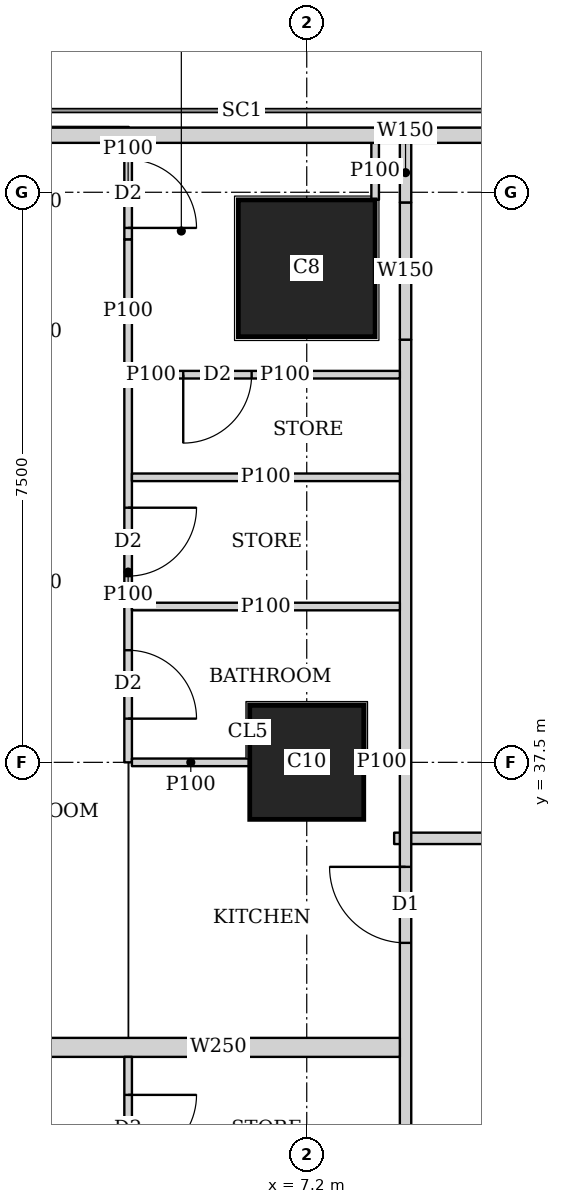
"""IFC4 building model, lengths in metres.
Left out: names, types, materials, properties, quantities, classifications, styles, units other than length and angle.
Written with IfcOpenShell. Run it as: python <this file> out.ifc"""

import sys

from ifc_helpers import new_model, si_unit, direction, frame, frame_2d, origin, origin_2d, place, context, subcontext, project, spatial, rectangle, extrude, element, fill, save


model = new_model("IFC4")
c1 = context("Model", 3, precision=1e-05, world=origin(), true_north=direction((0.0, 1.0)))
c2 = subcontext(c1, "Body", "Model", "MODEL_VIEW")
j1 = project(units=[si_unit("LENGTHUNIT", "METRE"), si_unit("PLANEANGLEUNIT", "RADIAN")], contexts=[c1])
p1 = place(None, origin())
s1 = spatial("IfcSite", under=j1, at=p1, CompositionType="ELEMENT")
p2 = place(p1, origin())
s2 = spatial("IfcBuilding", under=s1, at=p2, CompositionType="ELEMENT")
p3 = place(p2, frame((0.0, 0.0, 180.8)))
s3 = spatial("IfcBuildingStorey", under=s2, at=p3, CompositionType="ELEMENT", Elevation=180.8)
p4 = place(p3, frame((7.2, 37.5, 0.0), z_axis=(0.0, 0.0, 1.0), x_axis=(1.0, 0.0, 0.0)))
e1 = element("IfcColumn", 1, at=p4, inside=s3, PredefinedType="COLUMN", context=c2, shape_type="SweptSolid", body=[
    extrude(rectangle(XDim=1.5, YDim=1.5, at=origin_2d()), origin(), (0.0, 0.0, 1.0), 3.75),
])
p5 = place(p3, frame((7.2, 44.0, 0.0), z_axis=(0.0, 0.0, 1.0), x_axis=(1.0, 0.0, 0.0)))
e2 = element("IfcColumn", 2, at=p5, inside=s3, PredefinedType="COLUMN", context=c2, shape_type="SweptSolid", body=[
    extrude(rectangle(XDim=1.8, YDim=1.8, at=origin_2d()), origin(), (0.0, 0.0, 1.0), 3.75),
])
p6 = place(p3, frame((40.106, 45.75, 0.0), z_axis=(0.0, 0.0, 1.0), x_axis=(-1.0, 0.0, 0.0)))
e3 = element("IfcWall", 3, at=p6, inside=s3, PredefinedType="SOLIDWALL", context=c2, shape_type="SweptSolid", body=[
    extrude(rectangle(XDim=37.943, YDim=0.2, at=frame_2d((18.971, 0.0))), origin(), (0.0, 0.0, 1.0), 3.5),
])
p7 = place(p6, frame((8.606, 0.0, 0.9)))
e4 = element("IfcOpeningElement", 4, at=p7, cuts=e3, PredefinedType="OPENING", context=c2, shape_type="SweptSolid", body=[
    extrude(rectangle(XDim=1.8, YDim=1.5, at=frame_2d((0.9, 0.75))), frame((0.0, 0.11, 0.0), z_axis=(0.0, -1.0, 0.0), x_axis=(1.0, 0.0, 0.0)), (0.0, 0.0, 1.0), 0.22),
])
p8 = place(p6, frame((12.206, 0.0, 0.9)))
e5 = element("IfcOpeningElement", 5, at=p8, cuts=e3, PredefinedType="OPENING", context=c2, shape_type="SweptSolid", body=[
    extrude(rectangle(XDim=1.8, YDim=1.5, at=frame_2d((0.9, 0.75))), frame((0.0, 0.11, 0.0), z_axis=(0.0, -1.0, 0.0), x_axis=(1.0, 0.0, 0.0)), (0.0, 0.0, 1.0), 0.22),
])
p9 = place(p6, frame((15.806, 0.0, 0.9)))
e6 = element("IfcOpeningElement", 6, at=p9, cuts=e3, PredefinedType="OPENING", context=c2, shape_type="SweptSolid", body=[
    extrude(rectangle(XDim=1.8, YDim=1.5, at=frame_2d((0.9, 0.75))), frame((0.0, 0.11, 0.0), z_axis=(0.0, -1.0, 0.0), x_axis=(1.0, 0.0, 0.0)), (0.0, 0.0, 1.0), 0.22),
])
p10 = place(p6, frame((19.406, 0.0, 0.9)))
e7 = element("IfcOpeningElement", 7, at=p10, cuts=e3, PredefinedType="OPENING", context=c2, shape_type="SweptSolid", body=[
    extrude(rectangle(XDim=1.8, YDim=1.5, at=frame_2d((0.9, 0.75))), frame((0.0, 0.11, 0.0), z_axis=(0.0, -1.0, 0.0), x_axis=(1.0, 0.0, 0.0)), (0.0, 0.0, 1.0), 0.22),
])
p11 = place(p6, frame((23.006, 0.0, 0.9)))
e8 = element("IfcOpeningElement", 8, at=p11, cuts=e3, PredefinedType="OPENING", context=c2, shape_type="SweptSolid", body=[
    extrude(rectangle(XDim=1.8, YDim=1.5, at=frame_2d((0.9, 0.75))), frame((0.0, 0.11, 0.0), z_axis=(0.0, -1.0, 0.0), x_axis=(1.0, 0.0, 0.0)), (0.0, 0.0, 1.0), 0.22),
])
p12 = place(p6, frame((26.606, 0.0, 0.9)))
e9 = element("IfcOpeningElement", 9, at=p12, cuts=e3, PredefinedType="OPENING", context=c2, shape_type="SweptSolid", body=[
    extrude(rectangle(XDim=1.8, YDim=1.5, at=frame_2d((0.9, 0.75))), frame((0.0, 0.11, 0.0), z_axis=(0.0, -1.0, 0.0), x_axis=(1.0, 0.0, 0.0)), (0.0, 0.0, 1.0), 0.22),
])
p13 = place(p3, frame((8.5, 1.964, 0.0), z_axis=(0.0, 0.0, 1.0), x_axis=(0.0, 1.0, 0.0)))
e10 = element("IfcWall", 10, at=p13, inside=s3, PredefinedType="SOLIDWALL", context=c2, shape_type="SweptSolid", body=[
    extrude(rectangle(XDim=41.097, YDim=0.15, at=frame_2d((20.548, 0.0))), origin(), (0.0, 0.0, 1.0), 3.5),
])
p14 = place(p13, frame((10.661, 0.0, 0.0)))
e11 = element("IfcOpeningElement", 11, at=p14, cuts=e10, PredefinedType="OPENING", context=c2, shape_type="SweptSolid", body=[
    extrude(rectangle(XDim=1.0, YDim=2.1, at=frame_2d((0.5, 1.05))), frame((0.0, 0.085, 0.0), z_axis=(0.0, -1.0, 0.0), x_axis=(1.0, 0.0, 0.0)), (0.0, 0.0, 1.0), 0.17),
])
p15 = place(p13, frame((14.411, 0.0, 0.0)))
e12 = element("IfcOpeningElement", 12, at=p15, cuts=e10, PredefinedType="OPENING", context=c2, shape_type="SweptSolid", body=[
    extrude(rectangle(XDim=1.0, YDim=2.1, at=frame_2d((0.5, 1.05))), frame((0.0, 0.085, 0.0), z_axis=(0.0, -1.0, 0.0), x_axis=(1.0, 0.0, 0.0)), (0.0, 0.0, 1.0), 0.17),
])
p16 = place(p13, frame((21.911, 0.0, 0.0)))
e13 = element("IfcOpeningElement", 13, at=p16, cuts=e10, PredefinedType="OPENING", context=c2, shape_type="SweptSolid", body=[
    extrude(rectangle(XDim=1.0, YDim=2.1, at=frame_2d((0.5, 1.05))), frame((0.0, 0.085, 0.0), z_axis=(0.0, -1.0, 0.0), x_axis=(1.0, 0.0, 0.0)), (0.0, 0.0, 1.0), 0.17),
])
p17 = place(p13, frame((33.161, 0.0, 0.0)))
e14 = element("IfcOpeningElement", 14, at=p17, cuts=e10, PredefinedType="OPENING", context=c2, shape_type="SweptSolid", body=[
    extrude(rectangle(XDim=1.0, YDim=2.1, at=frame_2d((0.5, 1.05))), frame((0.0, 0.085, 0.0), z_axis=(0.0, -1.0, 0.0), x_axis=(1.0, 0.0, 0.0)), (0.0, 0.0, 1.0), 0.17),
])
p18 = place(p3, frame((8.5, 43.061, 0.0), z_axis=(0.0, 0.0, 1.0), x_axis=(0.0, 1.0, 0.0)))
e15 = element("IfcWall", 15, at=p18, inside=s3, PredefinedType="SOLIDWALL", context=c2, shape_type="SweptSolid", body=[
    extrude(rectangle(XDim=1.805, YDim=0.15, at=frame_2d((0.902, 0.0))), origin(), (0.0, 0.0, 1.0), 2.1),
])
p19 = place(p3, frame((8.5, 44.866, 0.0), z_axis=(0.0, 0.0, 1.0), x_axis=(0.0, 1.0, 0.0)))
e16 = element("IfcWall", 16, at=p19, inside=s3, PredefinedType="SOLIDWALL", context=c2, shape_type="SweptSolid", body=[
    extrude(rectangle(XDim=0.784, YDim=0.15, at=frame_2d((0.392, 0.0))), origin(), (0.0, 0.0, 1.0), 3.5),
])
p20 = place(p3, frame((8.35, 36.5, 0.0), z_axis=(0.0, 0.0, 1.0), x_axis=(1.0, 0.0, 0.0)))
e17 = element("IfcWall", 17, at=p20, inside=s3, PredefinedType="SOLIDWALL", context=c2, shape_type="SweptSolid", body=[
    extrude(rectangle(XDim=26.415, YDim=0.15, at=frame_2d((13.208, 0.0))), origin(), (0.0, 0.0, 1.0), 3.5),
])
p21 = place(p20, frame((2.6, 0.0, 0.0)))
e18 = element("IfcOpeningElement", 18, at=p21, cuts=e17, PredefinedType="OPENING", context=c2, shape_type="SweptSolid", body=[
    extrude(rectangle(XDim=1.0, YDim=2.1, at=frame_2d((0.5, 1.05))), frame((0.0, 0.085, 0.0), z_axis=(0.0, -1.0, 0.0), x_axis=(1.0, 0.0, 0.0)), (0.0, 0.0, 1.0), 0.17),
])
p22 = place(p20, frame((14.75, 0.0, 0.0)))
e19 = element("IfcOpeningElement", 19, at=p22, cuts=e17, PredefinedType="OPENING", context=c2, shape_type="SweptSolid", body=[
    extrude(rectangle(XDim=1.0, YDim=2.1, at=frame_2d((0.5, 1.05))), frame((0.0, 0.085, 0.0), z_axis=(0.0, -1.0, 0.0), x_axis=(1.0, 0.0, 0.0)), (0.0, 0.0, 1.0), 0.17),
])
p23 = place(p20, frame((23.923, 0.0, 0.0)))
e20 = element("IfcOpeningElement", 20, at=p23, cuts=e17, PredefinedType="OPENING", context=c2, shape_type="SweptSolid", body=[
    extrude(rectangle(XDim=1.0, YDim=2.1, at=frame_2d((0.5, 1.05))), frame((0.0, 0.085, 0.0), z_axis=(0.0, -1.0, 0.0), x_axis=(1.0, 0.0, 0.0)), (0.0, 0.0, 1.0), 0.17),
])
p24 = place(p3, frame((8.1, 45.65, 0.0), z_axis=(0.0, 0.0, 1.0), x_axis=(0.0, -1.0, 0.0)))
e21 = element("IfcWall", 21, at=p24, inside=s3, PredefinedType="PARTITIONING", context=c2, shape_type="SweptSolid", body=[
    extrude(rectangle(XDim=0.749, YDim=0.1, at=frame_2d((0.375, 0.0))), origin(), (0.0, 0.0, 1.0), 3.5),
])
p25 = place(p3, frame((4.85, 26.25, 0.0), z_axis=(0.0, 0.0, 1.0), x_axis=(0.0, 1.0, 0.0)))
e22 = element("IfcWall", 22, at=p25, inside=s3, PredefinedType="PARTITIONING", context=c2, shape_type="SweptSolid", body=[
    extrude(rectangle(XDim=7.375, YDim=0.1, at=frame_2d((3.688, 0.0))), origin(), (0.0, 0.0, 1.0), 3.5),
])
p26 = place(p25, frame((0.575, 0.0, 0.0)))
e23 = element("IfcOpeningElement", 23, at=p26, cuts=e22, PredefinedType="OPENING", context=c2, shape_type="SweptSolid", body=[
    extrude(rectangle(XDim=0.9, YDim=2.1, at=frame_2d((0.45, 1.05))), frame((0.0, 0.06, 0.0), z_axis=(0.0, -1.0, 0.0), x_axis=(1.0, 0.0, 0.0)), (0.0, 0.0, 1.0), 0.12),
])
p27 = place(p25, frame((4.1, 0.0, 0.0)))
e24 = element("IfcOpeningElement", 24, at=p27, cuts=e22, PredefinedType="OPENING", context=c2, shape_type="SweptSolid", body=[
    extrude(rectangle(XDim=0.9, YDim=2.1, at=frame_2d((0.45, 1.05))), frame((0.0, 0.06, 0.0), z_axis=(0.0, -1.0, 0.0), x_axis=(1.0, 0.0, 0.0)), (0.0, 0.0, 1.0), 0.12),
])
p28 = place(p25, frame((2.45, 0.0, 0.0)))
e25 = element("IfcOpeningElement", 25, at=p28, cuts=e22, PredefinedType="OPENING", context=c2, shape_type="SweptSolid", body=[
    extrude(rectangle(XDim=0.9, YDim=2.1, at=frame_2d((0.45, 1.05))), frame((0.0, 0.06, 0.0), z_axis=(0.0, -1.0, 0.0), x_axis=(1.0, 0.0, 0.0)), (0.0, 0.0, 1.0), 0.12),
])
p29 = place(p25, frame((5.975, 0.0, 0.0)))
e26 = element("IfcOpeningElement", 26, at=p29, cuts=e22, PredefinedType="OPENING", context=c2, shape_type="SweptSolid", body=[
    extrude(rectangle(XDim=0.9, YDim=2.1, at=frame_2d((0.45, 1.05))), frame((0.0, 0.06, 0.0), z_axis=(0.0, -1.0, 0.0), x_axis=(1.0, 0.0, 0.0)), (0.0, 0.0, 1.0), 0.12),
])
p30 = place(p3, frame((4.85, 37.5, 0.0), z_axis=(0.0, 0.0, 1.0), x_axis=(0.0, 1.0, 0.0)))
e27 = element("IfcWall", 27, at=p30, inside=s3, PredefinedType="PARTITIONING", context=c2, shape_type="SweptSolid", body=[
    extrude(rectangle(XDim=5.007, YDim=0.1, at=frame_2d((2.503, 0.0))), origin(), (0.0, 0.0, 1.0), 3.5),
])
p31 = place(p30, frame((0.575, 0.0, 0.0)))
e28 = element("IfcOpeningElement", 28, at=p31, cuts=e27, PredefinedType="OPENING", context=c2, shape_type="SweptSolid", body=[
    extrude(rectangle(XDim=0.9, YDim=2.1, at=frame_2d((0.45, 1.05))), frame((0.0, 0.06, 0.0), z_axis=(0.0, -1.0, 0.0), x_axis=(1.0, 0.0, 0.0)), (0.0, 0.0, 1.0), 0.12),
])
p32 = place(p30, frame((2.45, 0.0, 0.0)))
e29 = element("IfcOpeningElement", 29, at=p32, cuts=e27, PredefinedType="OPENING", context=c2, shape_type="SweptSolid", body=[
    extrude(rectangle(XDim=0.9, YDim=2.1, at=frame_2d((0.45, 1.05))), frame((0.0, 0.06, 0.0), z_axis=(0.0, -1.0, 0.0), x_axis=(1.0, 0.0, 0.0)), (0.0, 0.0, 1.0), 0.12),
])
p33 = place(p3, frame((4.85, 42.507, 0.0), z_axis=(0.0, 0.0, 1.0), x_axis=(0.0, 1.0, 0.0)))
e30 = element("IfcWall", 30, at=p33, inside=s3, PredefinedType="PARTITIONING", context=c2, shape_type="SweptSolid", body=[
    extrude(rectangle(XDim=1.874, YDim=0.1, at=frame_2d((0.937, 0.0))), origin(), (0.0, 0.0, 1.0), 2.1),
])
p34 = place(p3, frame((4.85, 44.381, 0.0), z_axis=(0.0, 0.0, 1.0), x_axis=(0.0, 1.0, 0.0)))
e31 = element("IfcWall", 31, at=p34, inside=s3, PredefinedType="PARTITIONING", context=c2, shape_type="SweptSolid", body=[
    extrude(rectangle(XDim=1.269, YDim=0.1, at=frame_2d((0.634, 0.0))), origin(), (0.0, 0.0, 1.0), 3.5),
])
p35 = place(p34, frame((0.15, 0.0, 0.0)))
e32 = element("IfcOpeningElement", 32, at=p35, cuts=e31, PredefinedType="OPENING", context=c2, shape_type="SweptSolid", body=[
    extrude(rectangle(XDim=0.9, YDim=2.1, at=frame_2d((0.45, 1.05))), frame((0.0, 0.06, 0.0), z_axis=(0.0, -1.0, 0.0), x_axis=(1.0, 0.0, 0.0)), (0.0, 0.0, 1.0), 0.12),
])
p36 = place(p3, frame((4.9, 37.5, 0.0), z_axis=(0.0, 0.0, 1.0), x_axis=(1.0, 0.0, 0.0)))
e33 = element("IfcWall", 33, at=p36, inside=s3, PredefinedType="PARTITIONING", context=c2, shape_type="SweptSolid", body=[
    extrude(rectangle(XDim=1.549, YDim=0.1, at=frame_2d((0.774, 0.0))), origin(), (0.0, 0.0, 1.0), 3.5),
])
p37 = place(p3, frame((7.951, 37.5, 0.0), z_axis=(0.0, 0.0, 1.0), x_axis=(1.0, 0.0, 0.0)))
e34 = element("IfcWall", 34, at=p37, inside=s3, PredefinedType="PARTITIONING", context=c2, shape_type="SweptSolid", body=[
    extrude(rectangle(XDim=0.474, YDim=0.1, at=frame_2d((0.237, 0.0))), origin(), (0.0, 0.0, 1.0), 3.5),
])
for number, where, z_axis, x_axis in (
    (35, (4.9, 41.25, 0.0), (0.0, 0.0, 1.0), (1.0, 0.0, 0.0)),
    (36, (4.9, 39.55, 0.0), (0.0, 0.0, 1.0), (1.0, 0.0, 0.0)),
):
    element("IfcWall", number, at=place(p3, frame(where, z_axis=z_axis, x_axis=x_axis)), inside=s3, PredefinedType="PARTITIONING", context=c2, shape_type="SweptSolid", body=[
        extrude(rectangle(XDim=3.525, YDim=0.1, at=frame_2d((1.763, 0.0))), origin(), (0.0, 0.0, 1.0), 3.5),
    ])
p38 = place(p3, frame((3.65, 33.75, 0.0), z_axis=(0.0, 0.0, 1.0), x_axis=(1.0, 0.0, 0.0)))
e37 = element("IfcWall", 37, at=p38, inside=s3, PredefinedType="SOLIDWALL", context=c2, shape_type="SweptSolid", body=[
    extrude(rectangle(XDim=4.775, YDim=0.25, at=frame_2d((2.388, 0.0))), origin(), (0.0, 0.0, 1.0), 3.5),
])
p39 = place(p3, frame((8.425, 42.6, 0.0), z_axis=(0.0, 0.0, 1.0), x_axis=(-1.0, 0.0, 0.0)))
e38 = element("IfcWall", 38, at=p39, inside=s3, PredefinedType="PARTITIONING", context=c2, shape_type="SweptSolid", body=[
    extrude(rectangle(XDim=3.022, YDim=0.1, at=frame_2d((1.511, 0.0))), origin(), (0.0, 0.0, 1.0), 3.5),
])
p40 = place(p39, frame((1.95, 0.0, 0.0)))
e39 = element("IfcOpeningElement", 39, at=p40, cuts=e38, PredefinedType="OPENING", context=c2, shape_type="SweptSolid", body=[
    extrude(rectangle(XDim=0.9, YDim=2.1, at=frame_2d((0.45, 1.05))), frame((0.0, 0.06, 0.0), z_axis=(0.0, -1.0, 0.0), x_axis=(1.0, 0.0, 0.0)), (0.0, 0.0, 1.0), 0.12),
])
p41 = place(p3, frame((5.403, 42.6, 0.0), z_axis=(0.0, 0.0, 1.0), x_axis=(-1.0, 0.0, 0.0)))
e40 = element("IfcWall", 40, at=p41, inside=s3, PredefinedType="PARTITIONING", context=c2, shape_type="SweptSolid", body=[
    extrude(rectangle(XDim=0.503, YDim=0.1, at=frame_2d((0.251, 0.0))), origin(), (0.0, 0.0, 1.0), 2.1),
])
p42 = place(p29, origin())
e41 = element("IfcDoor", 41, at=p42, inside=s3, OperationType="SINGLE_SWING_LEFT", PredefinedType="DOOR", context=c2, shape_type="SweptSolid", body=[
    extrude(rectangle(XDim=0.9, YDim=2.1, at=frame_2d((0.45, 1.05))), frame((0.0, 0.025, 0.0), z_axis=(0.0, -1.0, 0.0), x_axis=(1.0, 0.0, 0.0)), (0.0, 0.0, 1.0), 0.05),
])
fill(e26, e41)
p43 = place(p31, origin())
e42 = element("IfcDoor", 42, at=p43, inside=s3, OperationType="SINGLE_SWING_RIGHT", PredefinedType="DOOR", context=c2, shape_type="SweptSolid", body=[
    extrude(rectangle(XDim=0.9, YDim=2.1, at=frame_2d((0.45, 1.05))), frame((0.0, 0.025, 0.0), z_axis=(0.0, -1.0, 0.0), x_axis=(1.0, 0.0, 0.0)), (0.0, 0.0, 1.0), 0.05),
])
fill(e28, e42)
p44 = place(p35, origin())
e43 = element("IfcDoor", 43, at=p44, inside=s3, OperationType="SINGLE_SWING_RIGHT", PredefinedType="DOOR", context=c2, shape_type="SweptSolid", body=[
    extrude(rectangle(XDim=0.9, YDim=2.1, at=frame_2d((0.45, 1.05))), frame((0.0, 0.025, 0.0), z_axis=(0.0, -1.0, 0.0), x_axis=(1.0, 0.0, 0.0)), (0.0, 0.0, 1.0), 0.05),
])
fill(e32, e43)
p45 = place(p32, origin())
e44 = element("IfcDoor", 44, at=p45, inside=s3, OperationType="SINGLE_SWING_LEFT", PredefinedType="DOOR", context=c2, shape_type="SweptSolid", body=[
    extrude(rectangle(XDim=0.9, YDim=2.1, at=frame_2d((0.45, 1.05))), frame((0.0, 0.025, 0.0), z_axis=(0.0, -1.0, 0.0), x_axis=(1.0, 0.0, 0.0)), (0.0, 0.0, 1.0), 0.05),
])
fill(e29, e44)
p46 = place(p17, origin())
e45 = element("IfcDoor", 45, at=p46, inside=s3, OperationType="SINGLE_SWING_RIGHT", PredefinedType="DOOR", context=c2, shape_type="SweptSolid", body=[
    extrude(rectangle(XDim=1.0, YDim=2.1, at=frame_2d((0.5, 1.05))), frame((0.0, 0.025, 0.0), z_axis=(0.0, -1.0, 0.0), x_axis=(1.0, 0.0, 0.0)), (0.0, 0.0, 1.0), 0.05),
])
fill(e14, e45)
p47 = place(p40, origin())
e46 = element("IfcDoor", 46, at=p47, inside=s3, OperationType="SINGLE_SWING_RIGHT", PredefinedType="DOOR", context=c2, shape_type="SweptSolid", body=[
    extrude(rectangle(XDim=0.9, YDim=2.1, at=frame_2d((0.45, 1.05))), frame((0.0, 0.025, 0.0), z_axis=(0.0, -1.0, 0.0), x_axis=(1.0, 0.0, 0.0)), (0.0, 0.0, 1.0), 0.05),
])
fill(e39, e46)
save(model, sys.argv[1])
